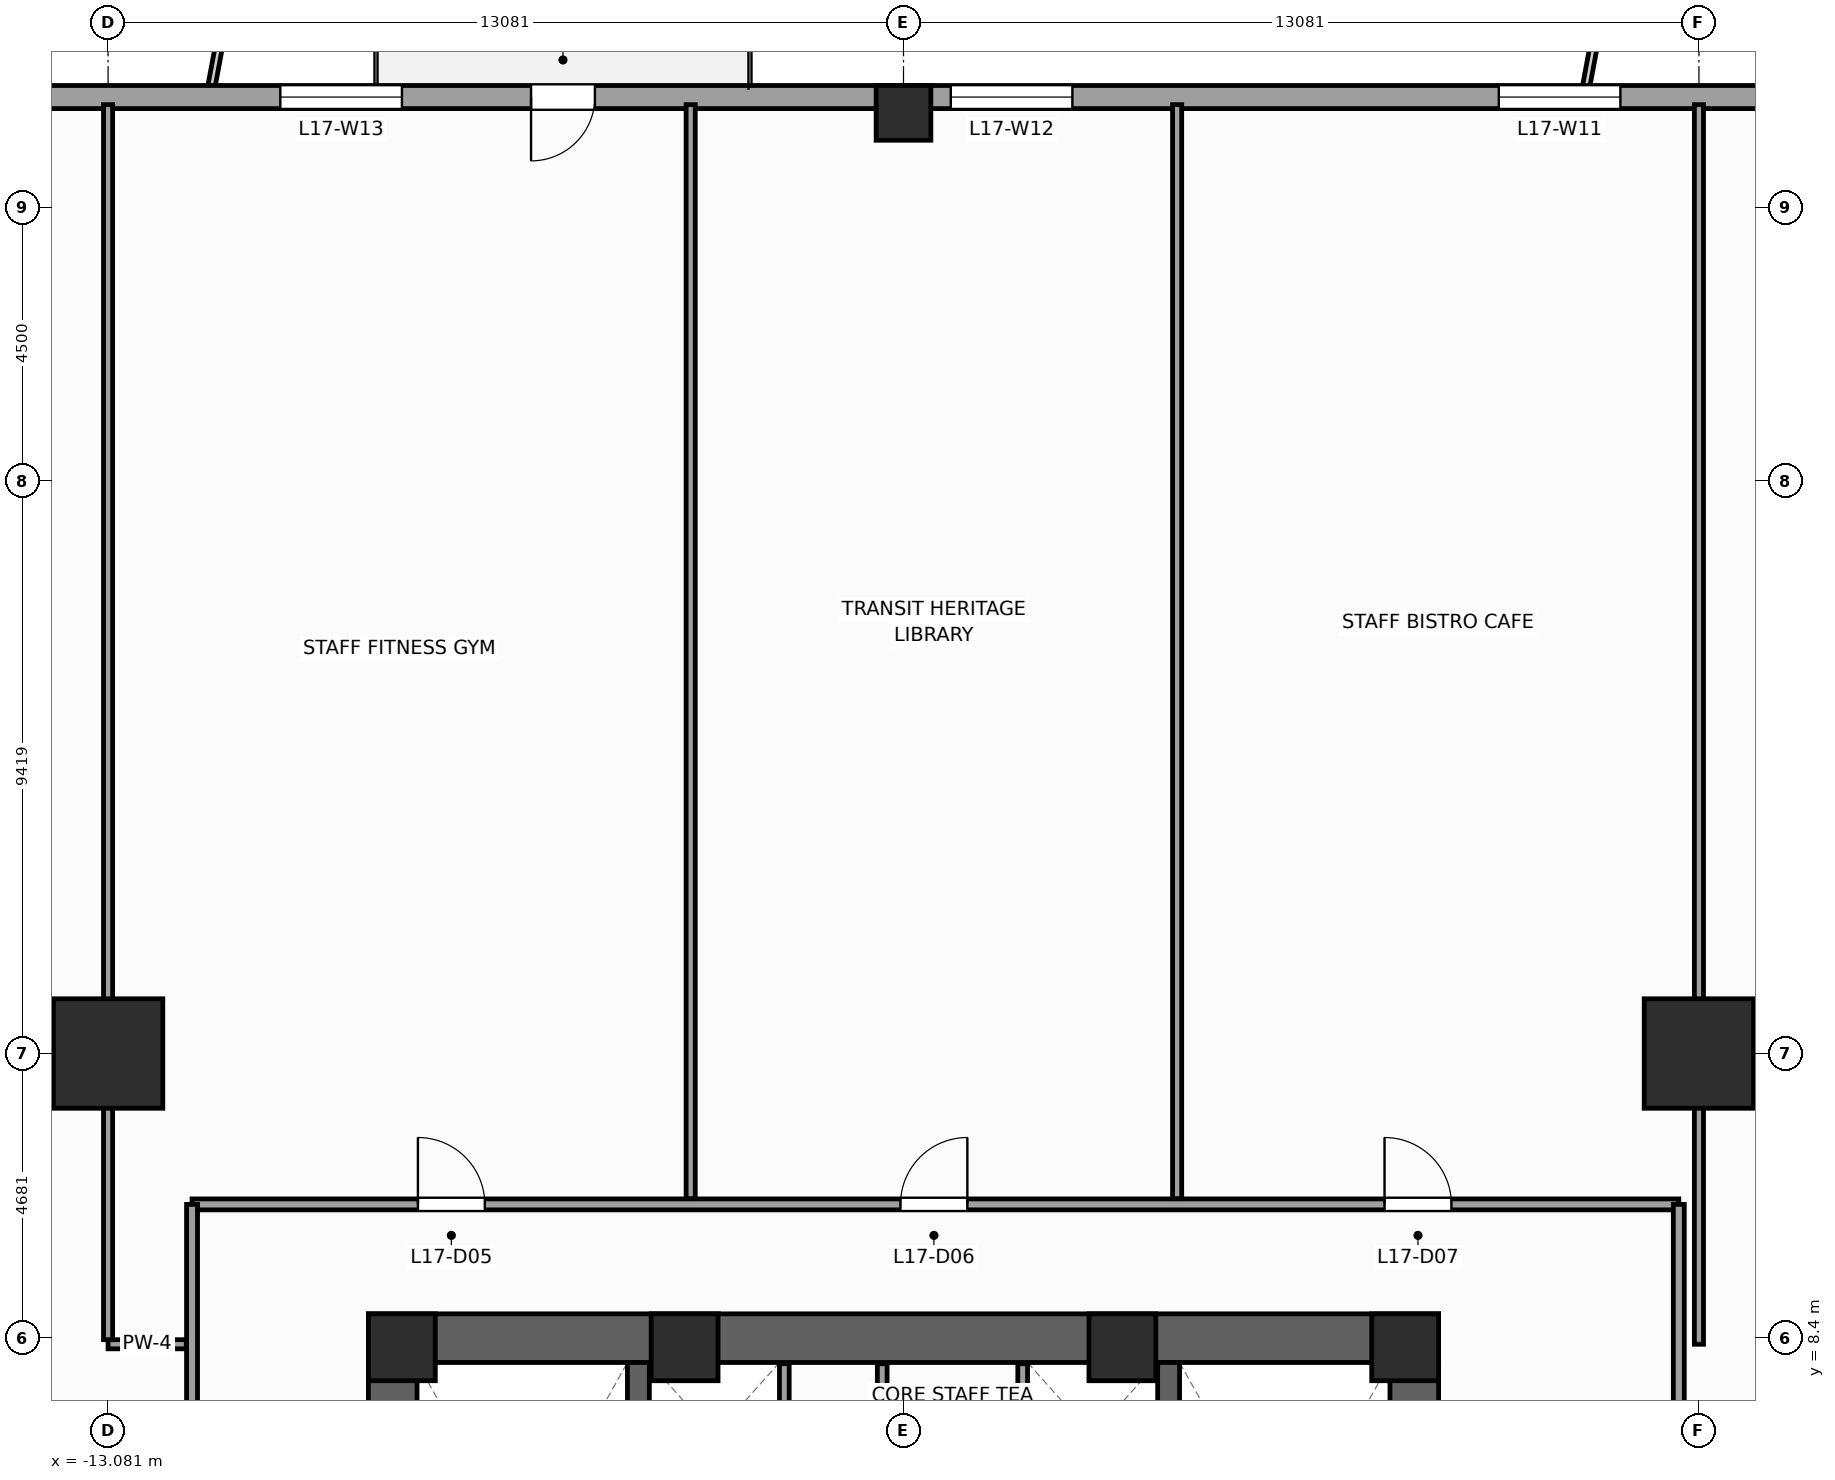
"""IFC4 building model, lengths in metres.
Left out: names, types, materials, properties, quantities, classifications, styles, units other than length and angle.
Written with IfcOpenShell. Run it as: python <this file> out.ifc"""

import sys

from ifc_helpers import new_model, si_unit, direction, frame, frame_2d, origin, origin_2d, place, context, subcontext, project, spatial, rectangle, extrude, source, transform, mapped, element, fill, save


model = new_model("IFC4")
c1 = context("Model", 3, precision=1e-05, world=origin(), true_north=direction((0.0, 1.0)))
c2 = subcontext(c1, "Body", "Model", "MODEL_VIEW")
j1 = project(units=[si_unit("LENGTHUNIT", "METRE"), si_unit("PLANEANGLEUNIT", "RADIAN")], contexts=[c1])
p1 = place(None, origin())
s1 = spatial("IfcSite", under=j1, at=p1, CompositionType="ELEMENT")
p2 = place(p1, origin())
s2 = spatial("IfcBuilding", under=s1, at=p2, CompositionType="ELEMENT")
p3 = place(p2, frame((0.0, 0.0, 74.0)))
s3 = spatial("IfcBuildingStorey", under=s2, at=p3, CompositionType="ELEMENT", Elevation=74.0)
p4 = place(p3, frame((-8.8, 8.4, 0.0), z_axis=(0.0, 0.0, 1.0), x_axis=(1.0, 0.0, 0.0)))
e1 = element("IfcWall", 1, at=p4, inside=s3, PredefinedType="SHEAR", context=c2, shape_type="SweptSolid", body=[
    extrude(rectangle(XDim=17.6, YDim=0.8, at=frame_2d((8.8, 0.0))), origin(), (0.0, 0.0, 1.0), 4.0),
])
p5 = place(p3, frame((-8.4, -8.0, 0.0), z_axis=(0.0, 0.0, 1.0), x_axis=(0.0, 1.0, 0.0)))
e2 = element("IfcWall", 2, at=p5, inside=s3, PredefinedType="SHEAR", context=c2, shape_type="SweptSolid", body=[
    extrude(rectangle(XDim=16.0, YDim=0.8, at=frame_2d((8.0, 0.0))), origin(), (0.0, 0.0, 1.0), 4.0),
])
p6 = place(p5, frame((4.69, 0.0, 0.0)))
e3 = element("IfcOpeningElement", 3, at=p6, cuts=e2, PredefinedType="OPENING", context=c2, shape_type="SweptSolid", body=[
    extrude(rectangle(XDim=1.3, YDim=2.2, at=frame_2d((0.65, 1.1))), frame((0.0, 0.41, 0.0), z_axis=(0.0, -1.0, 0.0), x_axis=(1.0, 0.0, 0.0)), (0.0, 0.0, 1.0), 0.82),
])
p7 = place(p3, frame((8.4, -8.0, 0.0), z_axis=(0.0, 0.0, 1.0), x_axis=(0.0, 1.0, 0.0)))
e4 = element("IfcWall", 4, at=p7, inside=s3, PredefinedType="SHEAR", context=c2, shape_type="SweptSolid", body=[
    extrude(rectangle(XDim=16.0, YDim=0.8, at=frame_2d((8.0, 0.0))), origin(), (0.0, 0.0, 1.0), 4.0),
])
p8 = place(p7, frame((4.69, 0.0, 0.0)))
e5 = element("IfcOpeningElement", 5, at=p8, cuts=e4, PredefinedType="OPENING", context=c2, shape_type="SweptSolid", body=[
    extrude(rectangle(XDim=1.3, YDim=2.2, at=frame_2d((0.65, 1.1))), frame((0.0, 0.41, 0.0), z_axis=(0.0, -1.0, 0.0), x_axis=(1.0, 0.0, 0.0)), (0.0, 0.0, 1.0), 0.82),
])
for number, where, z_axis, x_axis in (
    (6, (-4.36, -8.0, 0.0), (0.0, 0.0, 1.0), (0.0, 1.0, 0.0)),
    (7, (4.36, -8.0, 0.0), (0.0, 0.0, 1.0), (0.0, 1.0, 0.0)),
):
    element("IfcWall", number, at=place(p3, frame(where, z_axis=z_axis, x_axis=x_axis)), inside=s3, PredefinedType="SHEAR", context=c2, shape_type="SweptSolid", body=[
        extrude(rectangle(XDim=16.0, YDim=0.36, at=frame_2d((8.0, 0.0))), origin(), (0.0, 0.0, 1.0), 4.0),
    ])
m1 = source(origin(), c2, "Body", "SweptSolid", [
    extrude(rectangle(XDim=1.1, YDim=1.1, at=origin_2d()), origin(), (0.0, 0.0, 1.0), 4.0),
])
for number, where, z_axis, x_axis in (
    (8, (8.25, 8.25, 0.0), (0.0, 0.0, 1.0), (1.0, 0.0, 0.0)),
    (9, (-8.25, 8.25, 0.0), (0.0, 0.0, 1.0), (1.0, 0.0, 0.0)),
    (10, (-3.6, 8.25, 0.0), (0.0, 0.0, 1.0), (1.0, 0.0, 0.0)),
    (11, (3.6, 8.25, 0.0), (0.0, 0.0, 1.0), (1.0, 0.0, 0.0)),
):
    element("IfcColumn", number, at=place(p3, frame(where, z_axis=z_axis, x_axis=x_axis)), inside=s3, PredefinedType="PILASTER", context=c2, shape_type="MappedRepresentation", body=[
        mapped(m1, transform((0.0, 0.0, 0.0), scale=1.0)),
    ])
m2 = source(origin(), c2, "Body", "SweptSolid", [
    extrude(rectangle(XDim=1.8, YDim=1.8, at=origin_2d()), origin(), (0.0, 0.0, 1.0), 4.0),
])
for number, where, z_axis, x_axis in (
    (12, (13.081, 13.081, 0.0), (0.0, 0.0, 1.0), (1.0, 0.0, 0.0)),
    (13, (-13.081, 13.081, 0.0), (0.0, 0.0, 1.0), (1.0, 0.0, 0.0)),
):
    element("IfcColumn", number, at=place(p3, frame(where, z_axis=z_axis, x_axis=x_axis)), inside=s3, PredefinedType="COLUMN", context=c2, shape_type="MappedRepresentation", body=[
        mapped(m2, transform((0.0, 0.0, 0.0), scale=1.0)),
    ])
m3 = source(origin(), c2, "Body", "SweptSolid", [
    extrude(rectangle(XDim=0.9, YDim=0.9, at=origin_2d()), origin(), (0.0, 0.0, 1.0), 4.0),
])
p9 = place(p3, frame((0.0, 28.55, 0.0), z_axis=(0.0, 0.0, 1.0), x_axis=(1.0, 0.0, 0.0)))
e14 = element("IfcColumn", 14, at=p9, inside=s3, PredefinedType="COLUMN", context=c2, shape_type="MappedRepresentation", body=[
    mapped(m3, transform((0.0, 0.0, 0.0), scale=1.0)),
])
p10 = place(p3, frame((25.69, 28.81, 0.0), z_axis=(0.0, 0.0, 1.0), x_axis=(-1.0, 0.0, 0.0)))
e15 = element("IfcWall", 15, at=p10, inside=s3, PredefinedType="STANDARD", context=c2, shape_type="SweptSolid", body=[
    extrude(rectangle(XDim=51.38, YDim=0.38, at=frame_2d((25.69, 0.0))), origin(), (0.0, 0.0, 1.0), 2.2),
])
p11 = place(p10, frame((30.765, 0.0, 0.0)))
e16 = element("IfcOpeningElement", 16, at=p11, cuts=e15, PredefinedType="OPENING", context=c2, shape_type="SweptSolid", body=[
    extrude(rectangle(XDim=1.05, YDim=2.02, at=frame_2d((0.525, 1.01))), frame((0.0, 0.2, 0.0), z_axis=(0.0, -1.0, 0.0), x_axis=(1.0, 0.0, 0.0)), (0.0, 0.0, 1.0), 0.4),
])
p12 = place(p10, frame((5.166, 0.0, 0.67)))
e17 = element("IfcOpeningElement", 17, at=p12, cuts=e15, PredefinedType="OPENING", context=c2, shape_type="SweptSolid", body=[
    extrude(rectangle(XDim=2.0, YDim=1.45, at=frame_2d((1.0, 0.725))), frame((0.0, 0.2, 0.0), z_axis=(0.0, -1.0, 0.0), x_axis=(1.0, 0.0, 0.0)), (0.0, 0.0, 1.0), 0.4),
])
p13 = place(p10, frame((13.9, 0.0, 0.67)))
e18 = element("IfcOpeningElement", 18, at=p13, cuts=e15, PredefinedType="OPENING", context=c2, shape_type="SweptSolid", body=[
    extrude(rectangle(XDim=2.0, YDim=1.45, at=frame_2d((1.0, 0.725))), frame((0.0, 0.2, 0.0), z_axis=(0.0, -1.0, 0.0), x_axis=(1.0, 0.0, 0.0)), (0.0, 0.0, 1.0), 0.4),
])
p14 = place(p10, frame((22.912, 0.0, 0.67)))
e19 = element("IfcOpeningElement", 19, at=p14, cuts=e15, PredefinedType="OPENING", context=c2, shape_type="SweptSolid", body=[
    extrude(rectangle(XDim=2.0, YDim=1.45, at=frame_2d((1.0, 0.725))), frame((0.0, 0.2, 0.0), z_axis=(0.0, -1.0, 0.0), x_axis=(1.0, 0.0, 0.0)), (0.0, 0.0, 1.0), 0.4),
])
p15 = place(p10, frame((33.938, 0.0, 0.67)))
e20 = element("IfcOpeningElement", 20, at=p15, cuts=e15, PredefinedType="OPENING", context=c2, shape_type="SweptSolid", body=[
    extrude(rectangle(XDim=2.0, YDim=1.45, at=frame_2d((1.0, 0.725))), frame((0.0, 0.2, 0.0), z_axis=(0.0, -1.0, 0.0), x_axis=(1.0, 0.0, 0.0)), (0.0, 0.0, 1.0), 0.4),
])
p16 = place(p10, frame((43.187, 0.0, 0.67)))
e21 = element("IfcOpeningElement", 21, at=p16, cuts=e15, PredefinedType="OPENING", context=c2, shape_type="SweptSolid", body=[
    extrude(rectangle(XDim=2.0, YDim=1.45, at=frame_2d((1.0, 0.725))), frame((0.0, 0.2, 0.0), z_axis=(0.0, -1.0, 0.0), x_axis=(1.0, 0.0, 0.0)), (0.0, 0.0, 1.0), 0.4),
])
for number, where, z_axis, x_axis in (
    (22, (-1.96, 4.58, 0.0), (0.0, 0.0, 1.0), (0.0, 1.0, 0.0)),
    (23, (1.96, 4.58, 0.0), (0.0, 0.0, 1.0), (0.0, 1.0, 0.0)),
):
    element("IfcWall", number, at=place(p3, frame(where, z_axis=z_axis, x_axis=x_axis)), inside=s3, PredefinedType="PARTITIONING", context=c2, shape_type="SweptSolid", body=[
        extrude(rectangle(XDim=3.4, YDim=0.16, at=frame_2d((1.7, 0.0))), origin(), (0.0, 0.0, 1.0), 3.6),
    ])
p17 = place(p3, frame((-0.35, 4.6, 0.0), z_axis=(0.0, 0.0, 1.0), x_axis=(0.0, 1.0, 0.0)))
e24 = element("IfcWall", 24, at=p17, inside=s3, PredefinedType="PARTITIONING", context=c2, shape_type="SweptSolid", body=[
    extrude(rectangle(XDim=3.38, YDim=0.16, at=frame_2d((1.69, 0.0))), origin(), (0.0, 0.0, 1.0), 3.6),
])
p18 = place(p3, frame((-11.7, 10.6, 0.0), z_axis=(0.0, 0.0, 1.0), x_axis=(1.0, 0.0, 0.0)))
e25 = element("IfcWall", 25, at=p18, inside=s3, PredefinedType="PARTITIONING", context=c2, shape_type="SweptSolid", body=[
    extrude(rectangle(XDim=24.45, YDim=0.18, at=frame_2d((12.225, 0.0))), origin(), (0.0, 0.0, 1.0), 3.6),
])
p19 = place(p18, frame((3.714, 0.0, 0.0)))
e26 = element("IfcOpeningElement", 26, at=p19, cuts=e25, PredefinedType="OPENING", context=c2, shape_type="SweptSolid", body=[
    extrude(rectangle(XDim=1.1, YDim=2.2, at=frame_2d((0.55, 1.1))), frame((0.0, 0.1, 0.0), z_axis=(0.0, -1.0, 0.0), x_axis=(1.0, 0.0, 0.0)), (0.0, 0.0, 1.0), 0.2),
])
p20 = place(p18, frame((11.65, 0.0, 0.0)))
e27 = element("IfcOpeningElement", 27, at=p20, cuts=e25, PredefinedType="OPENING", context=c2, shape_type="SweptSolid", body=[
    extrude(rectangle(XDim=1.1, YDim=2.2, at=frame_2d((0.55, 1.1))), frame((0.0, 0.1, 0.0), z_axis=(0.0, -1.0, 0.0), x_axis=(1.0, 0.0, 0.0)), (0.0, 0.0, 1.0), 0.2),
])
p21 = place(p18, frame((19.611, 0.0, 0.0)))
e28 = element("IfcOpeningElement", 28, at=p21, cuts=e25, PredefinedType="OPENING", context=c2, shape_type="SweptSolid", body=[
    extrude(rectangle(XDim=1.1, YDim=2.2, at=frame_2d((0.55, 1.1))), frame((0.0, 0.1, 0.0), z_axis=(0.0, -1.0, 0.0), x_axis=(1.0, 0.0, 0.0)), (0.0, 0.0, 1.0), 0.2),
])
p22 = place(p3, frame((-11.7, -1.05, 0.0), z_axis=(0.0, 0.0, 1.0), x_axis=(0.0, 1.0, 0.0)))
e29 = element("IfcWall", 29, at=p22, inside=s3, PredefinedType="PARTITIONING", context=c2, shape_type="SweptSolid", body=[
    extrude(rectangle(XDim=11.65, YDim=0.18, at=frame_2d((5.825, 0.0))), origin(), (0.0, 0.0, 1.0), 3.6),
])
p23 = place(p22, frame((1.455, 0.0, 0.0)))
e30 = element("IfcOpeningElement", 30, at=p23, cuts=e29, PredefinedType="OPENING", context=c2, shape_type="SweptSolid", body=[
    extrude(rectangle(XDim=0.95, YDim=2.1, at=frame_2d((0.475, 1.05))), frame((0.0, 0.1, 0.0), z_axis=(0.0, -1.0, 0.0), x_axis=(1.0, 0.0, 0.0)), (0.0, 0.0, 1.0), 0.2),
])
p24 = place(p22, frame((6.462, 0.0, 0.0)))
e31 = element("IfcOpeningElement", 31, at=p24, cuts=e29, PredefinedType="OPENING", context=c2, shape_type="SweptSolid", body=[
    extrude(rectangle(XDim=1.1, YDim=2.2, at=frame_2d((0.55, 1.1))), frame((0.0, 0.1, 0.0), z_axis=(0.0, -1.0, 0.0), x_axis=(1.0, 0.0, 0.0)), (0.0, 0.0, 1.0), 0.2),
])
p25 = place(p3, frame((12.75, -1.05, 0.0), z_axis=(0.0, 0.0, 1.0), x_axis=(0.0, 1.0, 0.0)))
e32 = element("IfcWall", 32, at=p25, inside=s3, PredefinedType="PARTITIONING", context=c2, shape_type="SweptSolid", body=[
    extrude(rectangle(XDim=11.65, YDim=0.18, at=frame_2d((5.825, 0.0))), origin(), (0.0, 0.0, 1.0), 2.56),
])
p26 = place(p25, frame((6.462, 0.0, 0.0)))
e33 = element("IfcOpeningElement", 33, at=p26, cuts=e32, PredefinedType="OPENING", context=c2, shape_type="SweptSolid", body=[
    extrude(rectangle(XDim=1.1, YDim=2.2, at=frame_2d((0.55, 1.1))), frame((0.0, 0.1, 0.0), z_axis=(0.0, -1.0, 0.0), x_axis=(1.0, 0.0, 0.0)), (0.0, 0.0, 1.0), 0.2),
])
p27 = place(p3, frame((-11.795, 8.3, 0.0), z_axis=(0.0, 0.0, 1.0), x_axis=(-1.0, 0.0, 0.0)))
e34 = element("IfcWall", 34, at=p27, inside=s3, PredefinedType="PARTITIONING", context=c2, shape_type="SweptSolid", body=[
    extrude(rectangle(XDim=1.286, YDim=0.15, at=frame_2d((0.643, 0.0))), origin(), (0.0, 0.0, 1.0), 3.6),
])
p28 = place(p3, frame((-13.081, 8.375, 0.0), z_axis=(0.0, 0.0, 1.0), x_axis=(0.0, 1.0, 0.0)))
e35 = element("IfcWall", 35, at=p28, inside=s3, PredefinedType="PARTITIONING", context=c2, shape_type="SweptSolid", body=[
    extrude(rectangle(XDim=20.31, YDim=0.15, at=frame_2d((10.155, 0.0))), origin(), (0.0, 0.0, 1.0), 2.2),
])
p29 = place(p3, frame((-3.5, 10.695, 0.0), z_axis=(0.0, 0.0, 1.0), x_axis=(0.0, 1.0, 0.0)))
e36 = element("IfcWall", 36, at=p29, inside=s3, PredefinedType="PARTITIONING", context=c2, shape_type="SweptSolid", body=[
    extrude(rectangle(XDim=17.99, YDim=0.15, at=frame_2d((8.995, 0.0))), origin(), (0.0, 0.0, 1.0), 3.6),
])
p30 = place(p3, frame((4.5, 10.695, 0.0), z_axis=(0.0, 0.0, 1.0), x_axis=(0.0, 1.0, 0.0)))
e37 = element("IfcWall", 37, at=p30, inside=s3, PredefinedType="PARTITIONING", context=c2, shape_type="SweptSolid", body=[
    extrude(rectangle(XDim=17.99, YDim=0.15, at=frame_2d((8.995, 0.0))), origin(), (0.0, 0.0, 1.0), 3.27),
])
p31 = place(p3, frame((13.081, 8.3, 0.0), z_axis=(0.0, 0.0, 1.0), x_axis=(0.0, 1.0, 0.0)))
e38 = element("IfcWall", 38, at=p31, inside=s3, PredefinedType="PARTITIONING", context=c2, shape_type="SweptSolid", body=[
    extrude(rectangle(XDim=20.385, YDim=0.15, at=frame_2d((10.192, 0.0))), origin(), (0.0, 0.0, 1.0), 2.2),
])
m4 = source(origin(), c2, "Body", "SweptSolid", [
    extrude(rectangle(XDim=1.05, YDim=2.02, at=frame_2d((0.525, 1.01))), frame((0.0, 0.025, 0.0), z_axis=(0.0, -1.0, 0.0), x_axis=(1.0, 0.0, 0.0)), (0.0, 0.0, 1.0), 0.05),
])
p32 = place(p11, origin())
e39 = element("IfcDoor", 39, at=p32, inside=s3, OperationType="SINGLE_SWING_RIGHT", PredefinedType="DOOR", context=c2, shape_type="MappedRepresentation", body=[
    mapped(m4, transform((0.0, 0.0, 0.0), scale=1.0)),
])
fill(e16, e39)
m5 = source(origin(), c2, "Body", "SweptSolid", [
    extrude(rectangle(XDim=2.0, YDim=1.45, at=frame_2d((1.0, 0.725))), frame((0.0, 0.03, 0.0), z_axis=(0.0, -1.0, 0.0), x_axis=(1.0, 0.0, 0.0)), (0.0, 0.0, 1.0), 0.06),
])
p33 = place(p13, origin())
e40 = element("IfcWindow", 40, at=p33, inside=s3, PartitioningType="SINGLE_PANEL", PredefinedType="WINDOW", context=c2, shape_type="MappedRepresentation", body=[
    mapped(m5, transform((0.0, 0.0, 0.0), scale=1.0)),
])
fill(e18, e40)
p34 = place(p14, origin())
e41 = element("IfcWindow", 41, at=p34, inside=s3, PartitioningType="SINGLE_PANEL", PredefinedType="WINDOW", context=c2, shape_type="MappedRepresentation", body=[
    mapped(m5, transform((0.0, 0.0, 0.0), scale=1.0)),
])
fill(e19, e41)
p35 = place(p15, origin())
e42 = element("IfcWindow", 42, at=p35, inside=s3, PartitioningType="SINGLE_PANEL", PredefinedType="WINDOW", context=c2, shape_type="MappedRepresentation", body=[
    mapped(m5, transform((0.0, 0.0, 0.0), scale=1.0)),
])
fill(e20, e42)
m6 = source(origin(), c2, "Body", "SweptSolid", [
    extrude(rectangle(XDim=1.1, YDim=2.2, at=frame_2d((0.55, 1.1))), frame((0.0, 0.025, 0.0), z_axis=(0.0, -1.0, 0.0), x_axis=(1.0, 0.0, 0.0)), (0.0, 0.0, 1.0), 0.05),
])
p36 = place(p19, origin())
e43 = element("IfcDoor", 43, at=p36, inside=s3, OperationType="SINGLE_SWING_LEFT", PredefinedType="DOOR", context=c2, shape_type="MappedRepresentation", body=[
    mapped(m6, transform((0.0, 0.0, 0.0), scale=1.0)),
])
fill(e26, e43)
p37 = place(p20, origin())
e44 = element("IfcDoor", 44, at=p37, inside=s3, OperationType="SINGLE_SWING_RIGHT", PredefinedType="DOOR", context=c2, shape_type="MappedRepresentation", body=[
    mapped(m6, transform((0.0, 0.0, 0.0), scale=1.0)),
])
fill(e27, e44)
p38 = place(p21, origin())
e45 = element("IfcDoor", 45, at=p38, inside=s3, OperationType="SINGLE_SWING_LEFT", PredefinedType="DOOR", context=c2, shape_type="MappedRepresentation", body=[
    mapped(m6, transform((0.0, 0.0, 0.0), scale=1.0)),
])
fill(e28, e45)
save(model, sys.argv[1])
